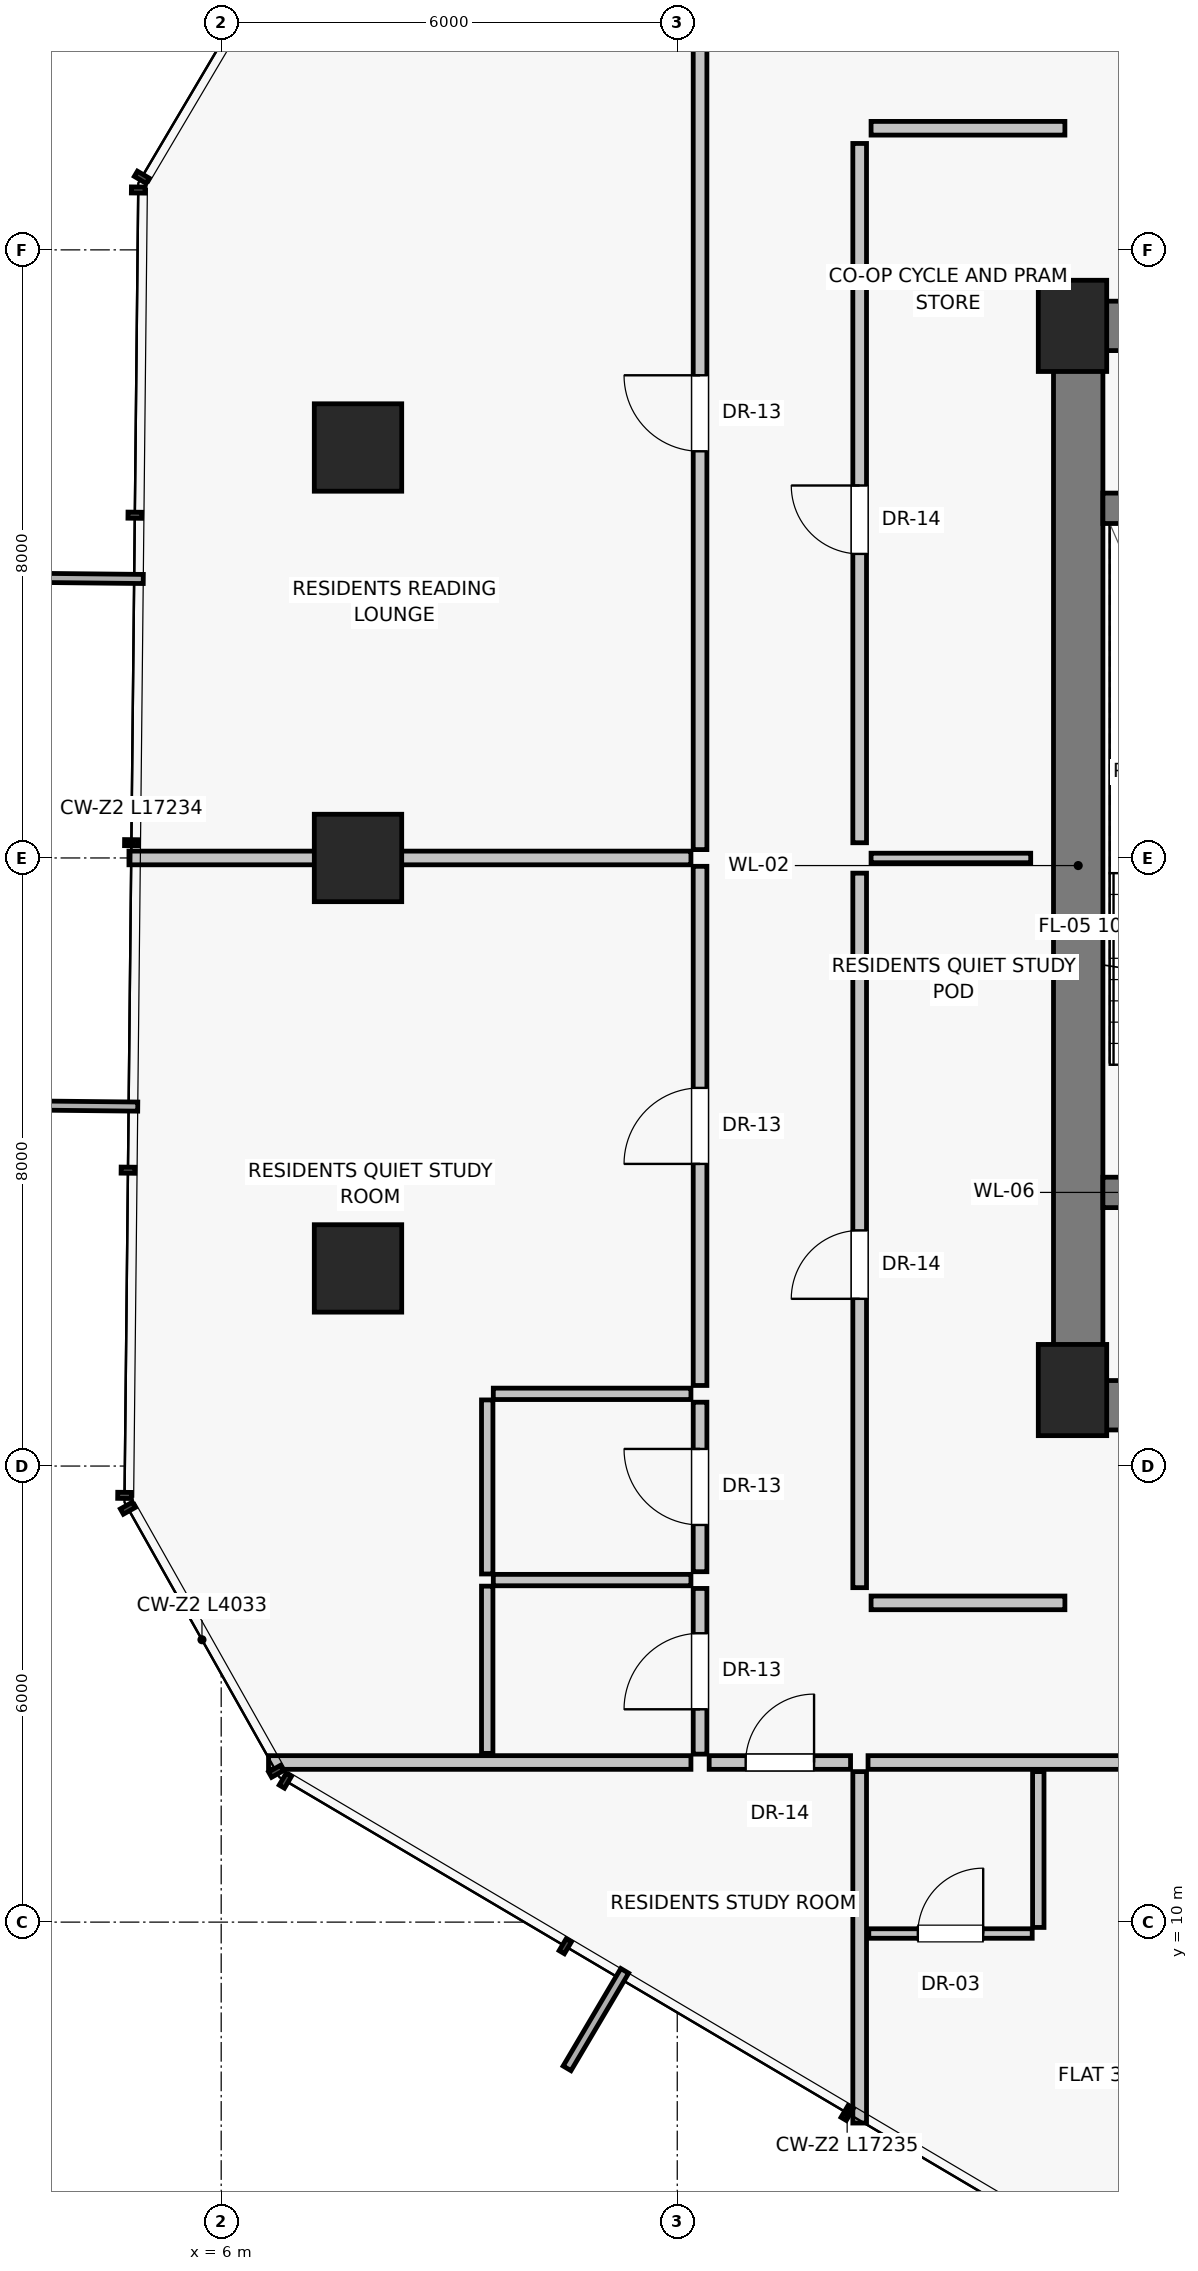
"""IFC4 building model, lengths in metres.
Left out: names, types, materials, properties, quantities, classifications, styles, units other than length and angle.
Written with IfcOpenShell. Run it as: python <this file> out.ifc"""

import sys

from ifc_helpers import new_model, si_unit, direction, frame, frame_2d, origin, origin_2d, place, context, subcontext, project, spatial, rectangle, extrude, source, transform, mapped, element, fill, save


model = new_model("IFC4")
c1 = context("Model", 3, precision=1e-05, world=origin(), true_north=direction((0.0, 1.0)))
c2 = subcontext(c1, "Body", "Model", "MODEL_VIEW")
j1 = project(units=[si_unit("LENGTHUNIT", "METRE"), si_unit("PLANEANGLEUNIT", "RADIAN")], contexts=[c1])
p1 = place(None, origin())
s1 = spatial("IfcSite", under=j1, at=p1, CompositionType="ELEMENT")
p2 = place(p1, origin())
s2 = spatial("IfcBuilding", under=s1, at=p2, CompositionType="ELEMENT")
p3 = place(p2, frame((0.0, 0.0, 126.25)))
s3 = spatial("IfcBuildingStorey", under=s2, at=p3, CompositionType="ELEMENT", Elevation=126.25)
for number, where, z_axis, x_axis in (
    (1, (17.2, 17.0, 0.0), (0.0, 0.0, 1.0), (1.0, 0.0, 0.0)),
    (2, (17.2, 31.0, 0.0), (0.0, 0.0, 1.0), (1.0, 0.0, 0.0)),
):
    element("IfcColumn", number, at=place(p3, frame(where, z_axis=z_axis, x_axis=x_axis)), inside=s3, PredefinedType="PILASTER", context=c2, shape_type="SweptSolid", body=[
        extrude(rectangle(XDim=0.9, YDim=1.2, at=origin_2d()), origin(), (0.0, 0.0, 1.0), 3.25),
    ])
for number, where, z_axis, x_axis in (
    (3, (7.8, 29.4, 0.0), (0.0, 0.0, 1.0), (1.0, 0.0, 0.0)),
    (4, (7.8, 24.0, 0.0), (0.0, 0.0, 1.0), (1.0, 0.0, 0.0)),
    (5, (7.8, 18.6, 0.0), (0.0, 0.0, 1.0), (1.0, 0.0, 0.0)),
):
    element("IfcColumn", number, at=place(p3, frame(where, z_axis=z_axis, x_axis=x_axis)), inside=s3, PredefinedType="COLUMN", context=c2, shape_type="SweptSolid", body=[
        extrude(rectangle(XDim=1.15, YDim=1.15, at=origin_2d()), origin(), (0.0, 0.0, 1.0), 3.25),
    ])
p4 = place(p3, frame((17.275, 16.8, 0.0), z_axis=(0.0, 0.0, 1.0), x_axis=(0.0, 1.0, 0.0)))
e6 = element("IfcWall", 6, at=p4, inside=s3, PredefinedType="SHEAR", context=c2, shape_type="SweptSolid", body=[
    extrude(rectangle(XDim=14.2, YDim=0.65, at=frame_2d((7.1, 0.0))), origin(), (0.0, 0.0, 1.0), 3.0),
])
p5 = place(p3, frame((17.2, 16.8, 0.0), z_axis=(0.0, 0.0, 1.0), x_axis=(1.0, 0.0, 0.0)))
e7 = element("IfcWall", 7, at=p5, inside=s3, PredefinedType="SHEAR", context=c2, shape_type="SweptSolid", body=[
    extrude(rectangle(XDim=5.85, YDim=0.65, at=frame_2d((2.925, 0.0))), origin(), (0.0, 0.0, 1.0), 3.0),
])
p6 = place(p5, frame((1.15, 0.0, 0.0)))
e8 = element("IfcOpeningElement", 8, at=p6, cuts=e7, PredefinedType="OPENING", context=c2, shape_type="SweptSolid", body=[
    extrude(rectangle(XDim=1.2, YDim=2.03, at=frame_2d((0.6, 1.015))), frame((0.0, 0.335, 0.0), z_axis=(0.0, -1.0, 0.0), x_axis=(1.0, 0.0, 0.0)), (0.0, 0.0, 1.0), 0.67),
])
p7 = place(p3, frame((17.2, 31.0, 0.0), z_axis=(0.0, 0.0, 1.0), x_axis=(1.0, 0.0, 0.0)))
e9 = element("IfcWall", 9, at=p7, inside=s3, PredefinedType="SHEAR", context=c2, shape_type="SweptSolid", body=[
    extrude(rectangle(XDim=3.8, YDim=0.65, at=frame_2d((1.9, 0.0))), origin(), (0.0, 0.0, 1.0), 3.0),
])
p8 = place(p7, frame((1.25, 0.0, 0.0)))
e10 = element("IfcOpeningElement", 10, at=p8, cuts=e9, PredefinedType="OPENING", context=c2, shape_type="SweptSolid", body=[
    extrude(rectangle(XDim=0.86, YDim=2.01, at=frame_2d((0.43, 1.005))), frame((0.0, 0.335, 0.0), z_axis=(0.0, -1.0, 0.0), x_axis=(1.0, 0.0, 0.0)), (0.0, 0.0, 1.0), 0.67),
])
p9 = place(p3, frame((17.6, 19.6, 0.0), z_axis=(0.0, 0.0, 1.0), x_axis=(1.0, 0.0, 0.0)))
e11 = element("IfcWall", 11, at=p9, inside=s3, PredefinedType="SHEAR", context=c2, shape_type="SweptSolid", body=[
    extrude(rectangle(XDim=3.4, YDim=0.4, at=frame_2d((1.7, 0.0))), origin(), (0.0, 0.0, 1.0), 3.0),
])
p10 = place(p9, frame((1.05, 0.0, 0.0)))
e12 = element("IfcOpeningElement", 12, at=p10, cuts=e11, PredefinedType="OPENING", context=c2, shape_type="SweptSolid", body=[
    extrude(rectangle(XDim=1.1, YDim=2.03, at=frame_2d((0.55, 1.015))), frame((0.0, 0.21, 0.0), z_axis=(0.0, -1.0, 0.0), x_axis=(1.0, 0.0, 0.0)), (0.0, 0.0, 1.0), 0.42),
])
p11 = place(p3, frame((17.6, 28.6, 0.0), z_axis=(0.0, 0.0, 1.0), x_axis=(1.0, 0.0, 0.0)))
e13 = element("IfcWall", 13, at=p11, inside=s3, PredefinedType="SHEAR", context=c2, shape_type="SweptSolid", body=[
    extrude(rectangle(XDim=3.4, YDim=0.4, at=frame_2d((1.7, 0.0))), origin(), (0.0, 0.0, 1.0), 3.0),
])
p12 = place(p3, frame((14.4, 14.4, 0.0), z_axis=(0.0, 0.0, 1.0), x_axis=(0.0, 1.0, 0.0)))
e14 = element("IfcWall", 14, at=p12, inside=s3, PredefinedType="PARTITIONING", context=c2, shape_type="SweptSolid", body=[
    extrude(rectangle(XDim=9.4, YDim=0.18, at=frame_2d((4.7, 0.0))), origin(), (0.0, 0.0, 1.0), 3.0),
])
p13 = place(p12, frame((3.8, 0.0, 0.0)))
e15 = element("IfcOpeningElement", 15, at=p13, cuts=e14, PredefinedType="OPENING", context=c2, shape_type="SweptSolid", body=[
    extrude(rectangle(XDim=0.9, YDim=2.01, at=frame_2d((0.45, 1.005))), frame((0.0, 0.1, 0.0), z_axis=(0.0, -1.0, 0.0), x_axis=(1.0, 0.0, 0.0)), (0.0, 0.0, 1.0), 0.2),
])
p14 = place(p3, frame((14.4, 24.2, 0.0), z_axis=(0.0, 0.0, 1.0), x_axis=(0.0, 1.0, 0.0)))
e16 = element("IfcWall", 16, at=p14, inside=s3, PredefinedType="PARTITIONING", context=c2, shape_type="SweptSolid", body=[
    extrude(rectangle(XDim=9.2, YDim=0.18, at=frame_2d((4.6, 0.0))), origin(), (0.0, 0.0, 1.0), 3.0),
])
p15 = place(p14, frame((3.8, 0.0, 0.0)))
e17 = element("IfcOpeningElement", 17, at=p15, cuts=e16, PredefinedType="OPENING", context=c2, shape_type="SweptSolid", body=[
    extrude(rectangle(XDim=0.9, YDim=2.01, at=frame_2d((0.45, 1.005))), frame((0.0, 0.1, 0.0), z_axis=(0.0, -1.0, 0.0), x_axis=(1.0, 0.0, 0.0)), (0.0, 0.0, 1.0), 0.2),
])
p16 = place(p3, frame((14.55, 24.0, 0.0), z_axis=(0.0, 0.0, 1.0), x_axis=(1.0, 0.0, 0.0)))
e18 = element("IfcWall", 18, at=p16, inside=s3, PredefinedType="PARTITIONING", context=c2, shape_type="SweptSolid", body=[
    extrude(rectangle(XDim=2.1, YDim=0.125, at=frame_2d((1.05, 0.0))), origin(), (0.0, 0.0, 1.0), 3.0),
])
for number, where, z_axis, x_axis in (
    (19, (14.55, 14.2, 0.0), (0.0, 0.0, 1.0), (1.0, 0.0, 0.0)),
    (20, (14.55, 33.6, 0.0), (0.0, 0.0, 1.0), (1.0, 0.0, 0.0)),
):
    element("IfcWall", number, at=place(p3, frame(where, z_axis=z_axis, x_axis=x_axis)), inside=s3, PredefinedType="PARTITIONING", context=c2, shape_type="SweptSolid", body=[
        extrude(rectangle(XDim=2.55, YDim=0.18, at=frame_2d((1.275, 0.0))), origin(), (0.0, 0.0, 1.0), 3.0),
    ])
p17 = place(p3, frame((14.4, 11.98, 0.0), z_axis=(0.0, 0.0, 1.0), x_axis=(0.0, -1.0, 0.0)))
e21 = element("IfcWall", 21, at=p17, inside=s3, PredefinedType="PARTITIONING", context=c2, shape_type="SweptSolid", body=[
    extrude(rectangle(XDim=4.623, YDim=0.18, at=frame_2d((2.312, 0.0))), origin(), (0.0, 0.0, 1.0), 3.0),
])
p18 = place(p3, frame((14.51, 12.1, 0.0), z_axis=(0.0, 0.0, 1.0), x_axis=(1.0, 0.0, 0.0)))
e22 = element("IfcWall", 22, at=p18, inside=s3, PredefinedType="PARTITIONING", context=c2, shape_type="SweptSolid", body=[
    extrude(rectangle(XDim=5.876, YDim=0.18, at=frame_2d((2.938, 0.0))), origin(), (0.0, 0.0, 1.0), 2.58),
])
p19 = place(p18, frame((3.549, 0.0, 0.0)))
e23 = element("IfcOpeningElement", 23, at=p19, cuts=e22, PredefinedType="OPENING", context=c2, shape_type="SweptSolid", body=[
    extrude(rectangle(XDim=0.95, YDim=2.02, at=frame_2d((0.475, 1.01))), frame((0.0, 0.1, 0.0), z_axis=(0.0, -1.0, 0.0), x_axis=(1.0, 0.0, 0.0)), (0.0, 0.0, 1.0), 0.2),
])
p20 = place(p3, frame((16.75, 11.98, 0.0), z_axis=(0.0, 0.0, 1.0), x_axis=(0.0, -1.0, 0.0)))
e24 = element("IfcWall", 24, at=p20, inside=s3, PredefinedType="PARTITIONING", context=c2, shape_type="SweptSolid", body=[
    extrude(rectangle(XDim=2.05, YDim=0.15, at=frame_2d((1.025, 0.0))), origin(), (0.0, 0.0, 1.0), 3.0),
])
p21 = place(p3, frame((14.52, 9.85, 0.0), z_axis=(0.0, 0.0, 1.0), x_axis=(1.0, 0.0, 0.0)))
e25 = element("IfcWall", 25, at=p21, inside=s3, PredefinedType="PARTITIONING", context=c2, shape_type="SweptSolid", body=[
    extrude(rectangle(XDim=2.15, YDim=0.125, at=frame_2d((1.075, 0.0))), origin(), (0.0, 0.0, 1.0), 3.0),
])
p22 = place(p21, frame((0.645, 0.0, 0.0)))
e26 = element("IfcOpeningElement", 26, at=p22, cuts=e25, PredefinedType="OPENING", context=c2, shape_type="SweptSolid", body=[
    extrude(rectangle(XDim=0.86, YDim=2.01, at=frame_2d((0.43, 1.005))), frame((0.0, 0.073, 0.0), z_axis=(0.0, -1.0, 0.0), x_axis=(1.0, 0.0, 0.0)), (0.0, 0.0, 1.0), 0.145),
])
p23 = place(p3, frame((12.18, 12.1, 0.0), z_axis=(0.0, 0.0, 1.0), x_axis=(-1.0, 0.0, 0.0)))
e27 = element("IfcWall", 27, at=p23, inside=s3, PredefinedType="PARTITIONING", context=c2, shape_type="SweptSolid", body=[
    extrude(rectangle(XDim=5.557, YDim=0.18, at=frame_2d((2.779, 0.0))), origin(), (0.0, 0.0, 1.0), 3.0),
])
p24 = place(p3, frame((12.3, 12.21, 0.0), z_axis=(0.0, 0.0, 1.0), x_axis=(0.0, 1.0, 0.0)))
e28 = element("IfcWall", 28, at=p24, inside=s3, PredefinedType="PARTITIONING", context=c2, shape_type="SweptSolid", body=[
    extrude(rectangle(XDim=2.18, YDim=0.18, at=frame_2d((1.09, 0.0))), origin(), (0.0, 0.0, 1.0), 3.0),
])
p25 = place(p24, frame((0.59, 0.0, 0.0)))
e29 = element("IfcOpeningElement", 29, at=p25, cuts=e28, PredefinedType="OPENING", context=c2, shape_type="SweptSolid", body=[
    extrude(rectangle(XDim=1.0, YDim=2.01, at=frame_2d((0.5, 1.005))), frame((0.0, 0.1, 0.0), z_axis=(0.0, -1.0, 0.0), x_axis=(1.0, 0.0, 0.0)), (0.0, 0.0, 1.0), 0.2),
])
p26 = place(p3, frame((12.3, 14.61, 0.0), z_axis=(0.0, 0.0, 1.0), x_axis=(0.0, 1.0, 0.0)))
e30 = element("IfcWall", 30, at=p26, inside=s3, PredefinedType="PARTITIONING", context=c2, shape_type="SweptSolid", body=[
    extrude(rectangle(XDim=2.23, YDim=0.18, at=frame_2d((1.115, 0.0))), origin(), (0.0, 0.0, 1.0), 3.0),
])
p27 = place(p26, frame((0.615, 0.0, 0.0)))
e31 = element("IfcOpeningElement", 31, at=p27, cuts=e30, PredefinedType="OPENING", context=c2, shape_type="SweptSolid", body=[
    extrude(rectangle(XDim=1.0, YDim=2.01, at=frame_2d((0.5, 1.005))), frame((0.0, 0.1, 0.0), z_axis=(0.0, -1.0, 0.0), x_axis=(1.0, 0.0, 0.0)), (0.0, 0.0, 1.0), 0.2),
])
p28 = place(p3, frame((12.3, 17.06, 0.0), z_axis=(0.0, 0.0, 1.0), x_axis=(0.0, 1.0, 0.0)))
e32 = element("IfcWall", 32, at=p28, inside=s3, PredefinedType="PARTITIONING", context=c2, shape_type="SweptSolid", body=[
    extrude(rectangle(XDim=6.83, YDim=0.18, at=frame_2d((3.415, 0.0))), origin(), (0.0, 0.0, 1.0), 2.58),
])
p29 = place(p28, frame((2.915, 0.0, 0.0)))
e33 = element("IfcOpeningElement", 33, at=p29, cuts=e32, PredefinedType="OPENING", context=c2, shape_type="SweptSolid", body=[
    extrude(rectangle(XDim=1.0, YDim=2.01, at=frame_2d((0.5, 1.005))), frame((0.0, 0.1, 0.0), z_axis=(0.0, -1.0, 0.0), x_axis=(1.0, 0.0, 0.0)), (0.0, 0.0, 1.0), 0.2),
])
p30 = place(p3, frame((12.3, 24.11, 0.0), z_axis=(0.0, 0.0, 1.0), x_axis=(0.0, 1.0, 0.0)))
e34 = element("IfcWall", 34, at=p30, inside=s3, PredefinedType="PARTITIONING", context=c2, shape_type="SweptSolid", body=[
    extrude(rectangle(XDim=11.48, YDim=0.18, at=frame_2d((5.74, 0.0))), origin(), (0.0, 0.0, 1.0), 2.58),
])
p31 = place(p30, frame((5.24, 0.0, 0.0)))
e35 = element("IfcOpeningElement", 35, at=p31, cuts=e34, PredefinedType="OPENING", context=c2, shape_type="SweptSolid", body=[
    extrude(rectangle(XDim=1.0, YDim=2.01, at=frame_2d((0.5, 1.005))), frame((0.0, 0.1, 0.0), z_axis=(0.0, -1.0, 0.0), x_axis=(1.0, 0.0, 0.0)), (0.0, 0.0, 1.0), 0.2),
])
for number, where, z_axis, x_axis in (
    (36, (12.18, 14.5, 0.0), (0.0, 0.0, 1.0), (-1.0, 0.0, 0.0)),
    (37, (12.18, 16.95, 0.0), (0.0, 0.0, 1.0), (-1.0, 0.0, 0.0)),
):
    element("IfcWall", number, at=place(p3, frame(where, z_axis=z_axis, x_axis=x_axis)), inside=s3, PredefinedType="PARTITIONING", context=c2, shape_type="SweptSolid", body=[
        extrude(rectangle(XDim=2.6, YDim=0.15, at=frame_2d((1.3, 0.0))), origin(), (0.0, 0.0, 1.0), 3.0),
    ])
p32 = place(p3, frame((9.5, 12.22, 0.0), z_axis=(0.0, 0.0, 1.0), x_axis=(0.0, 1.0, 0.0)))
e38 = element("IfcWall", 38, at=p32, inside=s3, PredefinedType="PARTITIONING", context=c2, shape_type="SweptSolid", body=[
    extrude(rectangle(XDim=2.2, YDim=0.15, at=frame_2d((1.1, 0.0))), origin(), (0.0, 0.0, 1.0), 3.0),
])
p33 = place(p3, frame((9.5, 14.58, 0.0), z_axis=(0.0, 0.0, 1.0), x_axis=(0.0, 1.0, 0.0)))
e39 = element("IfcWall", 39, at=p33, inside=s3, PredefinedType="PARTITIONING", context=c2, shape_type="SweptSolid", body=[
    extrude(rectangle(XDim=2.29, YDim=0.15, at=frame_2d((1.145, 0.0))), origin(), (0.0, 0.0, 1.0), 3.0),
])
p34 = place(p3, frame((12.18, 24.0, 0.0), z_axis=(0.0, 0.0, 1.0), x_axis=(-1.0, 0.0, 0.0)))
e40 = element("IfcWall", 40, at=p34, inside=s3, PredefinedType="PARTITIONING", context=c2, shape_type="SweptSolid", body=[
    extrude(rectangle(XDim=7.393, YDim=0.18, at=frame_2d((3.697, 0.0))), origin(), (0.0, 0.0, 1.0), 3.0),
])
p35 = place(p3, frame((12.42, 12.1, 0.0), z_axis=(0.0, 0.0, 1.0), x_axis=(1.0, 0.0, 0.0)))
e41 = element("IfcWall", 41, at=p35, inside=s3, PredefinedType="PARTITIONING", context=c2, shape_type="SweptSolid", body=[
    extrude(rectangle(XDim=1.86, YDim=0.18, at=frame_2d((0.93, 0.0))), origin(), (0.0, 0.0, 1.0), 3.0),
])
p36 = place(p35, frame((0.48, 0.0, 0.0)))
e42 = element("IfcOpeningElement", 42, at=p36, cuts=e41, PredefinedType="OPENING", context=c2, shape_type="SweptSolid", body=[
    extrude(rectangle(XDim=0.9, YDim=2.01, at=frame_2d((0.45, 1.005))), frame((0.0, 0.1, 0.0), z_axis=(0.0, -1.0, 0.0), x_axis=(1.0, 0.0, 0.0)), (0.0, 0.0, 1.0), 0.2),
])
m1 = source(origin(), c2, "Body", "SweptSolid", [
    extrude(rectangle(XDim=0.9, YDim=2.01, at=frame_2d((0.45, 1.005))), frame((0.0, 0.025, 0.0), z_axis=(0.0, -1.0, 0.0), x_axis=(1.0, 0.0, 0.0)), (0.0, 0.0, 1.0), 0.05),
])
p37 = place(p13, origin())
e43 = element("IfcDoor", 43, at=p37, inside=s3, OperationType="SINGLE_SWING_LEFT", PredefinedType="DOOR", context=c2, shape_type="MappedRepresentation", body=[
    mapped(m1, transform((0.0, 0.0, 0.0), scale=1.0)),
])
fill(e15, e43)
p38 = place(p15, origin())
e44 = element("IfcDoor", 44, at=p38, inside=s3, OperationType="SINGLE_SWING_RIGHT", PredefinedType="DOOR", context=c2, shape_type="MappedRepresentation", body=[
    mapped(m1, transform((0.0, 0.0, 0.0), scale=1.0)),
])
fill(e17, e44)
m2 = source(origin(), c2, "Body", "SweptSolid", [
    extrude(rectangle(XDim=0.86, YDim=2.01, at=frame_2d((0.43, 1.005))), frame((0.0, 0.025, 0.0), z_axis=(0.0, -1.0, 0.0), x_axis=(1.0, 0.0, 0.0)), (0.0, 0.0, 1.0), 0.05),
])
p39 = place(p22, origin())
e45 = element("IfcDoor", 45, at=p39, inside=s3, OperationType="SINGLE_SWING_RIGHT", PredefinedType="DOOR", context=c2, shape_type="MappedRepresentation", body=[
    mapped(m2, transform((0.0, 0.0, 0.0), scale=1.0)),
])
fill(e26, e45)
m3 = source(origin(), c2, "Body", "SweptSolid", [
    extrude(rectangle(XDim=1.0, YDim=2.01, at=frame_2d((0.5, 1.005))), frame((0.0, 0.025, 0.0), z_axis=(0.0, -1.0, 0.0), x_axis=(1.0, 0.0, 0.0)), (0.0, 0.0, 1.0), 0.05),
])
p40 = place(p25, origin())
e46 = element("IfcDoor", 46, at=p40, inside=s3, OperationType="SINGLE_SWING_LEFT", PredefinedType="DOOR", context=c2, shape_type="MappedRepresentation", body=[
    mapped(m3, transform((0.0, 0.0, 0.0), scale=1.0)),
])
fill(e29, e46)
p41 = place(p27, origin())
e47 = element("IfcDoor", 47, at=p41, inside=s3, OperationType="SINGLE_SWING_RIGHT", PredefinedType="DOOR", context=c2, shape_type="MappedRepresentation", body=[
    mapped(m3, transform((0.0, 0.0, 0.0), scale=1.0)),
])
fill(e31, e47)
p42 = place(p29, origin())
e48 = element("IfcDoor", 48, at=p42, inside=s3, OperationType="SINGLE_SWING_LEFT", PredefinedType="DOOR", context=c2, shape_type="MappedRepresentation", body=[
    mapped(m3, transform((0.0, 0.0, 0.0), scale=1.0)),
])
fill(e33, e48)
p43 = place(p31, origin())
e49 = element("IfcDoor", 49, at=p43, inside=s3, OperationType="SINGLE_SWING_RIGHT", PredefinedType="DOOR", context=c2, shape_type="MappedRepresentation", body=[
    mapped(m3, transform((0.0, 0.0, 0.0), scale=1.0)),
])
fill(e35, e49)
p44 = place(p36, origin())
e50 = element("IfcDoor", 50, at=p44, inside=s3, OperationType="SINGLE_SWING_RIGHT", PredefinedType="DOOR", context=c2, shape_type="MappedRepresentation", body=[
    mapped(m1, transform((0.0, 0.0, 0.0), scale=1.0)),
])
fill(e42, e50)
save(model, sys.argv[1])
